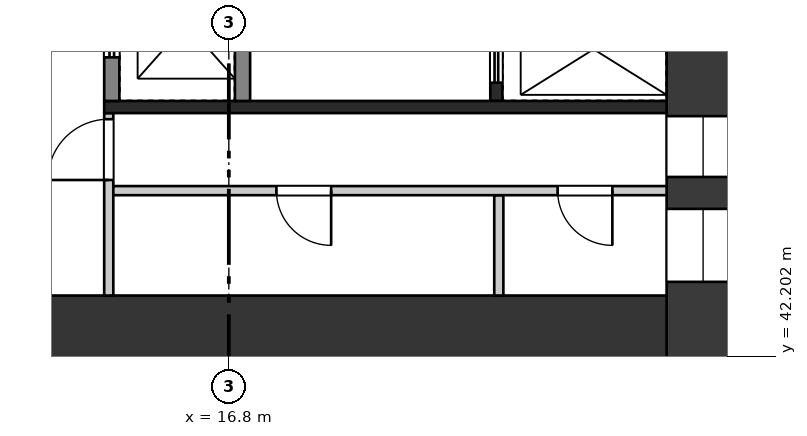
"""IFC4 building model, lengths in metres.
Left out: names, types, materials, properties, quantities, classifications, styles, units other than length and angle.
Written with IfcOpenShell. Run it as: python <this file> out.ifc"""

import sys

from ifc_helpers import new_model, si_unit, direction, frame, frame_2d, origin, place, context, subcontext, project, spatial, rectangle, extrude, element, fill, save


model = new_model("IFC4")
c1 = context("Model", 3, precision=1e-05, world=origin(), true_north=direction((0.0, 1.0)))
c2 = subcontext(c1, "Body", "Model", "MODEL_VIEW")
j1 = project(units=[si_unit("LENGTHUNIT", "METRE"), si_unit("PLANEANGLEUNIT", "RADIAN")], contexts=[c1])
p1 = place(None, origin())
s1 = spatial("IfcSite", under=j1, at=p1, CompositionType="ELEMENT")
p2 = place(p1, origin())
s2 = spatial("IfcBuilding", under=s1, at=p2, CompositionType="ELEMENT")
p3 = place(p2, frame((0.0, 0.0, 214.2)))
s3 = spatial("IfcBuildingStorey", under=s2, at=p3, CompositionType="ELEMENT", Elevation=214.2)
p4 = place(p3, frame((24.6, 58.8, 0.0), z_axis=(0.0, 0.0, 1.0), x_axis=(0.0, -1.0, 0.0)))
e1 = element("IfcWall", 1, at=p4, inside=s3, PredefinedType="SHEAR", context=c2, shape_type="SweptSolid", body=[
    extrude(rectangle(XDim=16.8, YDim=1.2, at=frame_2d((8.4, 0.0))), origin(), (0.0, 0.0, 1.0), 3.22),
])
p5 = place(p4, frame((1.8, 0.0, 0.5)))
e2 = element("IfcOpeningElement", 2, at=p5, cuts=e1, PredefinedType="OPENING", context=c2, shape_type="SweptSolid", body=[
    extrude(rectangle(XDim=1.8, YDim=2.4, at=frame_2d((0.9, 1.2))), frame((0.0, 0.61, 0.0), z_axis=(0.0, -1.0, 0.0), x_axis=(1.0, 0.0, 0.0)), (0.0, 0.0, 1.0), 1.22),
])
p6 = place(p4, frame((4.49, 0.0, 1.6)))
e3 = element("IfcOpeningElement", 3, at=p6, cuts=e1, PredefinedType="OPENING", context=c2, shape_type="SweptSolid", body=[
    extrude(rectangle(XDim=0.9, YDim=1.2, at=frame_2d((0.45, 0.6))), frame((0.0, 0.61, 0.0), z_axis=(0.0, -1.0, 0.0), x_axis=(1.0, 0.0, 0.0)), (0.0, 0.0, 1.0), 1.22),
])
p7 = place(p4, frame((5.71, 0.0, 1.6)))
e4 = element("IfcOpeningElement", 4, at=p7, cuts=e1, PredefinedType="OPENING", context=c2, shape_type="SweptSolid", body=[
    extrude(rectangle(XDim=1.1, YDim=1.2, at=frame_2d((0.55, 0.6))), frame((0.0, 0.61, 0.0), z_axis=(0.0, -1.0, 0.0), x_axis=(1.0, 0.0, 0.0)), (0.0, 0.0, 1.0), 1.22),
])
p8 = place(p4, frame((7.15, 0.0, 1.6)))
e5 = element("IfcOpeningElement", 5, at=p8, cuts=e1, PredefinedType="OPENING", context=c2, shape_type="SweptSolid", body=[
    extrude(rectangle(XDim=1.1, YDim=1.2, at=frame_2d((0.55, 0.6))), frame((0.0, 0.61, 0.0), z_axis=(0.0, -1.0, 0.0), x_axis=(1.0, 0.0, 0.0)), (0.0, 0.0, 1.0), 1.22),
])
p9 = place(p4, frame((12.65, 0.0, 0.6)))
e6 = element("IfcOpeningElement", 6, at=p9, cuts=e1, PredefinedType="OPENING", context=c2, shape_type="SweptSolid", body=[
    extrude(rectangle(XDim=1.0, YDim=2.1, at=frame_2d((0.5, 1.05))), frame((0.0, 0.61, 0.0), z_axis=(0.0, -1.0, 0.0), x_axis=(1.0, 0.0, 0.0)), (0.0, 0.0, 1.0), 1.22),
])
p10 = place(p4, frame((14.175, 0.0, 1.6)))
e7 = element("IfcOpeningElement", 7, at=p10, cuts=e1, PredefinedType="OPENING", context=c2, shape_type="SweptSolid", body=[
    extrude(rectangle(XDim=1.2, YDim=1.2, at=frame_2d((0.6, 0.6))), frame((0.0, 0.61, 0.0), z_axis=(0.0, -1.0, 0.0), x_axis=(1.0, 0.0, 0.0)), (0.0, 0.0, 1.0), 1.22),
])
p11 = place(p3, frame((9.6, 42.6, 0.0), z_axis=(0.0, 0.0, 1.0), x_axis=(1.0, 0.0, 0.0)))
e8 = element("IfcWall", 8, at=p11, inside=s3, PredefinedType="SHEAR", context=c2, shape_type="SweptSolid", body=[
    extrude(rectangle(XDim=14.4, YDim=1.2, at=frame_2d((7.2, 0.0))), origin(), (0.0, 0.0, 1.0), 3.22),
])
p12 = place(p11, frame((2.1, 0.0, 0.0)))
e9 = element("IfcOpeningElement", 9, at=p12, cuts=e8, PredefinedType="OPENING", context=c2, shape_type="SweptSolid", body=[
    extrude(rectangle(XDim=1.8, YDim=2.1, at=frame_2d((0.9, 1.05))), frame((0.0, 0.61, 0.0), z_axis=(0.0, -1.0, 0.0), x_axis=(1.0, 0.0, 0.0)), (0.0, 0.0, 1.0), 1.22),
])
p13 = place(p3, frame((14.875, 54.4, 0.0), z_axis=(0.0, 0.0, 1.0), x_axis=(0.0, -1.0, 0.0)))
e10 = element("IfcWall", 10, at=p13, inside=s3, PredefinedType="SHEAR", context=c2, shape_type="SweptSolid", body=[
    extrude(rectangle(XDim=8.0, YDim=0.25, at=frame_2d((4.0, 0.0))), origin(), (0.0, 0.0, 1.0), 3.22),
])
p14 = place(p13, frame((0.717, 0.0, 0.0)))
e11 = element("IfcOpeningElement", 11, at=p14, cuts=e10, PredefinedType="OPENING", context=c2, shape_type="SweptSolid", body=[
    extrude(rectangle(XDim=1.1, YDim=2.1, at=frame_2d((0.55, 1.05))), frame((0.0, 0.135, 0.0), z_axis=(0.0, -1.0, 0.0), x_axis=(1.0, 0.0, 0.0)), (0.0, 0.0, 1.0), 0.27),
])
p15 = place(p13, frame((3.45, 0.0, 0.0)))
e12 = element("IfcOpeningElement", 12, at=p15, cuts=e10, PredefinedType="OPENING", context=c2, shape_type="SweptSolid", body=[
    extrude(rectangle(XDim=1.1, YDim=2.1, at=frame_2d((0.55, 1.05))), frame((0.0, 0.135, 0.0), z_axis=(0.0, -1.0, 0.0), x_axis=(1.0, 0.0, 0.0)), (0.0, 0.0, 1.0), 0.27),
])
p16 = place(p13, frame((6.183, 0.0, 0.0)))
e13 = element("IfcOpeningElement", 13, at=p16, cuts=e10, PredefinedType="OPENING", context=c2, shape_type="SweptSolid", body=[
    extrude(rectangle(XDim=1.1, YDim=2.1, at=frame_2d((0.55, 1.05))), frame((0.0, 0.135, 0.0), z_axis=(0.0, -1.0, 0.0), x_axis=(1.0, 0.0, 0.0)), (0.0, 0.0, 1.0), 0.27),
])
p17 = place(p3, frame((17.025, 54.4, 0.0), z_axis=(0.0, 0.0, 1.0), x_axis=(0.0, -1.0, 0.0)))
e14 = element("IfcWall", 14, at=p17, inside=s3, PredefinedType="SHEAR", context=c2, shape_type="SweptSolid", body=[
    extrude(rectangle(XDim=8.0, YDim=0.25, at=frame_2d((4.0, 0.0))), origin(), (0.0, 0.0, 1.0), 3.22),
])
p18 = place(p3, frame((21.2, 54.4, 0.0), z_axis=(0.0, 0.0, 1.0), x_axis=(0.0, -1.0, 0.0)))
e15 = element("IfcWall", 15, at=p18, inside=s3, PredefinedType="SHEAR", context=c2, shape_type="SweptSolid", body=[
    extrude(rectangle(XDim=8.0, YDim=0.2, at=frame_2d((4.0, 0.0))), origin(), (0.0, 0.0, 1.0), 3.22),
])
p19 = place(p18, frame((0.09, 0.0, 0.0)))
e16 = element("IfcOpeningElement", 16, at=p19, cuts=e15, PredefinedType="OPENING", context=c2, shape_type="SweptSolid", body=[
    extrude(rectangle(XDim=0.9, YDim=2.1, at=frame_2d((0.45, 1.05))), frame((0.0, 0.11, 0.0), z_axis=(0.0, -1.0, 0.0), x_axis=(1.0, 0.0, 0.0)), (0.0, 0.0, 1.0), 0.22),
])
p20 = place(p18, frame((1.41, 0.0, 0.0)))
e17 = element("IfcOpeningElement", 17, at=p20, cuts=e15, PredefinedType="OPENING", context=c2, shape_type="SweptSolid", body=[
    extrude(rectangle(XDim=0.9, YDim=2.1, at=frame_2d((0.45, 1.05))), frame((0.0, 0.11, 0.0), z_axis=(0.0, -1.0, 0.0), x_axis=(1.0, 0.0, 0.0)), (0.0, 0.0, 1.0), 0.22),
])
p21 = place(p18, frame((2.82, 0.0, 0.0)))
e18 = element("IfcOpeningElement", 18, at=p21, cuts=e15, PredefinedType="OPENING", context=c2, shape_type="SweptSolid", body=[
    extrude(rectangle(XDim=0.9, YDim=2.1, at=frame_2d((0.45, 1.05))), frame((0.0, 0.11, 0.0), z_axis=(0.0, -1.0, 0.0), x_axis=(1.0, 0.0, 0.0)), (0.0, 0.0, 1.0), 0.22),
])
p22 = place(p18, frame((4.55, 0.0, 0.0)))
e19 = element("IfcOpeningElement", 19, at=p22, cuts=e15, PredefinedType="OPENING", context=c2, shape_type="SweptSolid", body=[
    extrude(rectangle(XDim=1.1, YDim=2.1, at=frame_2d((0.55, 1.05))), frame((0.0, 0.11, 0.0), z_axis=(0.0, -1.0, 0.0), x_axis=(1.0, 0.0, 0.0)), (0.0, 0.0, 1.0), 0.22),
])
p23 = place(p18, frame((6.6, 0.0, 0.0)))
e20 = element("IfcOpeningElement", 20, at=p23, cuts=e15, PredefinedType="OPENING", context=c2, shape_type="SweptSolid", body=[
    extrude(rectangle(XDim=1.1, YDim=2.1, at=frame_2d((0.55, 1.05))), frame((0.0, 0.11, 0.0), z_axis=(0.0, -1.0, 0.0), x_axis=(1.0, 0.0, 0.0)), (0.0, 0.0, 1.0), 0.22),
])
p24 = place(p3, frame((14.75, 46.3, 0.0), z_axis=(0.0, 0.0, 1.0), x_axis=(1.0, 0.0, 0.0)))
e21 = element("IfcWall", 21, at=p24, inside=s3, PredefinedType="SHEAR", context=c2, shape_type="SweptSolid", body=[
    extrude(rectangle(XDim=9.25, YDim=0.2, at=frame_2d((4.625, 0.0))), origin(), (0.0, 0.0, 1.0), 3.22),
])
p25 = place(p3, frame((14.825, 46.2, 0.0), z_axis=(0.0, 0.0, 1.0), x_axis=(0.0, -1.0, 0.0)))
e22 = element("IfcWall", 22, at=p25, inside=s3, PredefinedType="PARTITIONING", context=c2, shape_type="SweptSolid", body=[
    extrude(rectangle(XDim=3.0, YDim=0.15, at=frame_2d((1.5, 0.0))), origin(), (0.0, 0.0, 1.0), 3.22),
])
p26 = place(p25, frame((0.1, 0.0, 0.0)))
e23 = element("IfcOpeningElement", 23, at=p26, cuts=e22, PredefinedType="OPENING", context=c2, shape_type="SweptSolid", body=[
    extrude(rectangle(XDim=1.0, YDim=2.1, at=frame_2d((0.5, 1.05))), frame((0.0, 0.085, 0.0), z_axis=(0.0, -1.0, 0.0), x_axis=(1.0, 0.0, 0.0)), (0.0, 0.0, 1.0), 0.17),
])
p27 = place(p3, frame((21.24, 44.85, 0.0), z_axis=(0.0, 0.0, 1.0), x_axis=(0.0, -1.0, 0.0)))
e24 = element("IfcWall", 24, at=p27, inside=s3, PredefinedType="PARTITIONING", context=c2, shape_type="SweptSolid", body=[
    extrude(rectangle(XDim=1.65, YDim=0.15, at=frame_2d((0.825, 0.0))), origin(), (0.0, 0.0, 1.0), 3.22),
])
p28 = place(p3, frame((14.9, 44.925, 0.0), z_axis=(0.0, 0.0, 1.0), x_axis=(1.0, 0.0, 0.0)))
e25 = element("IfcWall", 25, at=p28, inside=s3, PredefinedType="PARTITIONING", context=c2, shape_type="SweptSolid", body=[
    extrude(rectangle(XDim=9.1, YDim=0.15, at=frame_2d((4.55, 0.0))), origin(), (0.0, 0.0, 1.0), 3.22),
])
p29 = place(p28, frame((2.683, 0.0, 0.0)))
e26 = element("IfcOpeningElement", 26, at=p29, cuts=e25, PredefinedType="OPENING", context=c2, shape_type="SweptSolid", body=[
    extrude(rectangle(XDim=0.9, YDim=2.1, at=frame_2d((0.45, 1.05))), frame((0.0, 0.085, 0.0), z_axis=(0.0, -1.0, 0.0), x_axis=(1.0, 0.0, 0.0)), (0.0, 0.0, 1.0), 0.17),
])
p30 = place(p28, frame((7.308, 0.0, 0.0)))
e27 = element("IfcOpeningElement", 27, at=p30, cuts=e25, PredefinedType="OPENING", context=c2, shape_type="SweptSolid", body=[
    extrude(rectangle(XDim=0.9, YDim=2.1, at=frame_2d((0.45, 1.05))), frame((0.0, 0.085, 0.0), z_axis=(0.0, -1.0, 0.0), x_axis=(1.0, 0.0, 0.0)), (0.0, 0.0, 1.0), 0.17),
])
p31 = place(p16, origin())
e28 = element("IfcDoor", 28, at=p31, inside=s3, OperationType="DOUBLE_DOOR_SLIDING", PredefinedType="DOOR", context=c2, shape_type="SweptSolid", body=[
    extrude(rectangle(XDim=1.1, YDim=2.1, at=frame_2d((0.55, 1.05))), frame((0.0, 0.025, 0.0), z_axis=(0.0, -1.0, 0.0), x_axis=(1.0, 0.0, 0.0)), (0.0, 0.0, 1.0), 0.05),
])
fill(e13, e28)
p32 = place(p23, origin())
e29 = element("IfcDoor", 29, at=p32, inside=s3, OperationType="DOUBLE_DOOR_SLIDING", PredefinedType="DOOR", context=c2, shape_type="SweptSolid", body=[
    extrude(rectangle(XDim=1.1, YDim=2.1, at=frame_2d((0.55, 1.05))), frame((0.0, 0.025, 0.0), z_axis=(0.0, -1.0, 0.0), x_axis=(1.0, 0.0, 0.0)), (0.0, 0.0, 1.0), 0.05),
])
fill(e20, e29)
p33 = place(p26, frame((1.0, 0.0, 0.0), z_axis=(0.0, 0.0, 1.0), x_axis=(-1.0, 0.0, 0.0)))
e30 = element("IfcDoor", 30, at=p33, inside=s3, OperationType="SINGLE_SWING_LEFT", PredefinedType="DOOR", context=c2, shape_type="SweptSolid", body=[
    extrude(rectangle(XDim=1.0, YDim=2.1, at=frame_2d((0.5, 1.05))), frame((0.0, 0.025, 0.0), z_axis=(0.0, -1.0, 0.0), x_axis=(1.0, 0.0, 0.0)), (0.0, 0.0, 1.0), 0.05),
])
fill(e23, e30)
p34 = place(p29, frame((0.9, 0.0, 0.0), z_axis=(0.0, 0.0, 1.0), x_axis=(-1.0, 0.0, 0.0)))
e31 = element("IfcDoor", 31, at=p34, inside=s3, OperationType="SINGLE_SWING_LEFT", PredefinedType="DOOR", context=c2, shape_type="SweptSolid", body=[
    extrude(rectangle(XDim=0.9, YDim=2.1, at=frame_2d((0.45, 1.05))), frame((0.0, 0.025, 0.0), z_axis=(0.0, -1.0, 0.0), x_axis=(1.0, 0.0, 0.0)), (0.0, 0.0, 1.0), 0.05),
])
fill(e26, e31)
p35 = place(p30, frame((0.9, 0.0, 0.0), z_axis=(0.0, 0.0, 1.0), x_axis=(-1.0, 0.0, 0.0)))
e32 = element("IfcDoor", 32, at=p35, inside=s3, OperationType="SINGLE_SWING_LEFT", PredefinedType="DOOR", context=c2, shape_type="SweptSolid", body=[
    extrude(rectangle(XDim=0.9, YDim=2.1, at=frame_2d((0.45, 1.05))), frame((0.0, 0.025, 0.0), z_axis=(0.0, -1.0, 0.0), x_axis=(1.0, 0.0, 0.0)), (0.0, 0.0, 1.0), 0.05),
])
fill(e27, e32)
p36 = place(p9, origin())
e33 = element("IfcWindow", 33, at=p36, inside=s3, PartitioningType="SINGLE_PANEL", PredefinedType="WINDOW", context=c2, shape_type="SweptSolid", body=[
    extrude(rectangle(XDim=1.0, YDim=2.1, at=frame_2d((0.5, 1.05))), frame((0.0, 0.03, 0.0), z_axis=(0.0, -1.0, 0.0), x_axis=(1.0, 0.0, 0.0)), (0.0, 0.0, 1.0), 0.06),
])
fill(e6, e33)
p37 = place(p10, origin())
e34 = element("IfcWindow", 34, at=p37, inside=s3, PartitioningType="SINGLE_PANEL", PredefinedType="WINDOW", context=c2, shape_type="SweptSolid", body=[
    extrude(rectangle(XDim=1.2, YDim=1.2, at=frame_2d((0.6, 0.6))), frame((0.0, 0.03, 0.0), z_axis=(0.0, -1.0, 0.0), x_axis=(1.0, 0.0, 0.0)), (0.0, 0.0, 1.0), 0.06),
])
fill(e7, e34)
save(model, sys.argv[1])
